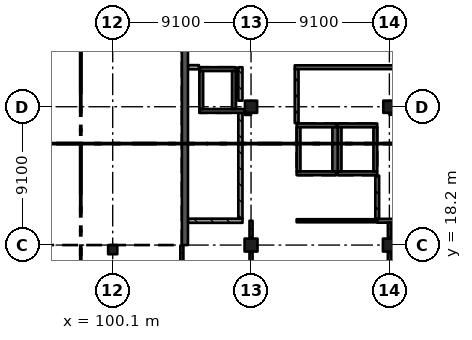
"""IFC4 building model, lengths in metres.
Left out: names, types, materials, properties, quantities, classifications, styles, units other than length and angle.
Written with IfcOpenShell. Run it as: python <this file> out.ifc"""

import sys

from ifc_helpers import new_model, si_unit, direction, frame, frame_2d, origin, origin_2d, place, context, subcontext, project, spatial, rectangle, extrude, element, fill, save


model = new_model("IFC4")
c1 = context("Model", 3, precision=1e-05, world=origin(), true_north=direction((0.0, 1.0)))
c2 = subcontext(c1, "Body", "Model", "MODEL_VIEW")
j1 = project(units=[si_unit("LENGTHUNIT", "METRE"), si_unit("PLANEANGLEUNIT", "RADIAN")], contexts=[c1])
p1 = place(None, origin())
s1 = spatial("IfcSite", under=j1, at=p1, CompositionType="ELEMENT")
p2 = place(p1, origin())
s2 = spatial("IfcBuilding", under=s1, at=p2, CompositionType="ELEMENT")
p3 = place(p2, frame((0.0, 0.0, 6.37)))
s3 = spatial("IfcBuildingStorey", under=s2, at=p3, CompositionType="ELEMENT", Elevation=6.37)
p4 = place(p3, frame((100.1, 17.9, 0.0), z_axis=(0.0, 0.0, 1.0), x_axis=(1.0, 0.0, 0.0)))
e1 = element("IfcColumn", 1, at=p4, inside=s3, PredefinedType="COLUMN", context=c2, shape_type="SweptSolid", body=[
    extrude(rectangle(XDim=0.6, YDim=0.6, at=origin_2d()), origin(), (0.0, 0.0, 1.0), 4.55),
])
p5 = place(p3, frame((109.2, 18.2, 0.0), z_axis=(0.0, 0.0, 1.0), x_axis=(1.0, 0.0, 0.0)))
e2 = element("IfcColumn", 2, at=p5, inside=s3, PredefinedType="COLUMN", context=c2, shape_type="SweptSolid", body=[
    extrude(rectangle(XDim=0.85, YDim=0.85, at=origin_2d()), origin(), (0.0, 0.0, 1.0), 4.55),
])
p6 = place(p3, frame((109.2, 27.3, 0.0), z_axis=(0.0, 0.0, 1.0), x_axis=(1.0, 0.0, 0.0)))
e3 = element("IfcColumn", 3, at=p6, inside=s3, PredefinedType="COLUMN", context=c2, shape_type="SweptSolid", body=[
    extrude(rectangle(XDim=0.8, YDim=0.8, at=origin_2d()), origin(), (0.0, 0.0, 1.0), 4.55),
])
p7 = place(p3, frame((118.3, 18.2, 0.0), z_axis=(0.0, 0.0, 1.0), x_axis=(1.0, 0.0, 0.0)))
e4 = element("IfcColumn", 4, at=p7, inside=s3, PredefinedType="COLUMN", context=c2, shape_type="SweptSolid", body=[
    extrude(rectangle(XDim=0.85, YDim=0.85, at=origin_2d()), origin(), (0.0, 0.0, 1.0), 4.55),
])
p8 = place(p3, frame((118.3, 27.3, 0.0), z_axis=(0.0, 0.0, 1.0), x_axis=(1.0, 0.0, 0.0)))
e5 = element("IfcColumn", 5, at=p8, inside=s3, PredefinedType="COLUMN", context=c2, shape_type="SweptSolid", body=[
    extrude(rectangle(XDim=0.8, YDim=0.8, at=origin_2d()), origin(), (0.0, 0.0, 1.0), 4.55),
])
p9 = place(p3, frame((104.85, 40.95, 0.0), z_axis=(0.0, 0.0, 1.0), x_axis=(0.0, -1.0, 0.0)))
e6 = element("IfcWall", 6, at=p9, inside=s3, PredefinedType="SHEAR", context=c2, shape_type="SweptSolid", body=[
    extrude(rectangle(XDim=22.75, YDim=0.4, at=frame_2d((11.375, 0.0))), origin(), (0.0, 0.0, 1.0), 4.55),
])
p10 = place(p3, frame((117.5, 22.925, 0.0), z_axis=(0.0, 0.0, 1.0), x_axis=(-1.0, 0.0, 0.0)))
e7 = element("IfcWall", 7, at=p10, inside=s3, PredefinedType="SHEAR", context=c2, shape_type="SweptSolid", body=[
    extrude(rectangle(XDim=2.6, YDim=0.25, at=frame_2d((1.3, 0.0))), origin(), (0.0, 0.0, 1.0), 4.55),
])
p11 = place(p10, frame((0.8, 0.0, 0.0)))
e8 = element("IfcOpeningElement", 8, at=p11, cuts=e7, PredefinedType="OPENING", context=c2, shape_type="SweptSolid", body=[
    extrude(rectangle(XDim=1.0, YDim=2.1, at=frame_2d((0.5, 1.05))), frame((0.0, 0.135, 0.0), z_axis=(0.0, -1.0, 0.0), x_axis=(1.0, 0.0, 0.0)), (0.0, 0.0, 1.0), 0.27),
])
p12 = place(p3, frame((117.5, 26.075, 0.0), z_axis=(0.0, 0.0, 1.0), x_axis=(-1.0, 0.0, 0.0)))
e9 = element("IfcWall", 9, at=p12, inside=s3, PredefinedType="SHEAR", context=c2, shape_type="SweptSolid", body=[
    extrude(rectangle(XDim=2.6, YDim=0.25, at=frame_2d((1.3, 0.0))), origin(), (0.0, 0.0, 1.0), 4.55),
])
for number, where, z_axis, x_axis in (
    (10, (115.025, 25.95, 0.0), (0.0, 0.0, 1.0), (0.0, -1.0, 0.0)),
    (11, (117.375, 25.95, 0.0), (0.0, 0.0, 1.0), (0.0, -1.0, 0.0)),
):
    element("IfcWall", number, at=place(p3, frame(where, z_axis=z_axis, x_axis=x_axis)), inside=s3, PredefinedType="SHEAR", context=c2, shape_type="SweptSolid", body=[
        extrude(rectangle(XDim=2.9, YDim=0.25, at=frame_2d((1.45, 0.0))), origin(), (0.0, 0.0, 1.0), 4.55),
    ])
p13 = place(p3, frame((114.8, 22.925, 0.0), z_axis=(0.0, 0.0, 1.0), x_axis=(-1.0, 0.0, 0.0)))
e12 = element("IfcWall", 12, at=p13, inside=s3, PredefinedType="SHEAR", context=c2, shape_type="SweptSolid", body=[
    extrude(rectangle(XDim=2.6, YDim=0.25, at=frame_2d((1.3, 0.0))), origin(), (0.0, 0.0, 1.0), 4.55),
])
p14 = place(p13, frame((0.8, 0.0, 0.0)))
e13 = element("IfcOpeningElement", 13, at=p14, cuts=e12, PredefinedType="OPENING", context=c2, shape_type="SweptSolid", body=[
    extrude(rectangle(XDim=1.0, YDim=2.1, at=frame_2d((0.5, 1.05))), frame((0.0, 0.135, 0.0), z_axis=(0.0, -1.0, 0.0), x_axis=(1.0, 0.0, 0.0)), (0.0, 0.0, 1.0), 0.27),
])
p15 = place(p3, frame((114.8, 26.075, 0.0), z_axis=(0.0, 0.0, 1.0), x_axis=(-1.0, 0.0, 0.0)))
e14 = element("IfcWall", 14, at=p15, inside=s3, PredefinedType="SHEAR", context=c2, shape_type="SweptSolid", body=[
    extrude(rectangle(XDim=2.6, YDim=0.25, at=frame_2d((1.3, 0.0))), origin(), (0.0, 0.0, 1.0), 4.55),
])
p16 = place(p3, frame((112.325, 25.95, 0.0), z_axis=(0.0, 0.0, 1.0), x_axis=(0.0, -1.0, 0.0)))
e15 = element("IfcWall", 15, at=p16, inside=s3, PredefinedType="SHEAR", context=c2, shape_type="SweptSolid", body=[
    extrude(rectangle(XDim=2.9, YDim=0.25, at=frame_2d((1.45, 0.0))), origin(), (0.0, 0.0, 1.0), 4.55),
])
p17 = place(p3, frame((114.725, 25.95, 0.0), z_axis=(0.0, 0.0, 1.0), x_axis=(0.0, -1.0, 0.0)))
e16 = element("IfcWall", 16, at=p17, inside=s3, PredefinedType="SHEAR", context=c2, shape_type="SweptSolid", body=[
    extrude(rectangle(XDim=2.9, YDim=0.35, at=frame_2d((1.45, 0.0))), origin(), (0.0, 0.0, 1.0), 4.55),
])
p18 = place(p3, frame((108.8, 27.025, 0.0), z_axis=(0.0, 0.0, 1.0), x_axis=(-1.0, 0.0, 0.0)))
e17 = element("IfcWall", 17, at=p18, inside=s3, PredefinedType="SHEAR", context=c2, shape_type="SweptSolid", body=[
    extrude(rectangle(XDim=3.0, YDim=0.25, at=frame_2d((1.5, 0.0))), origin(), (0.0, 0.0, 1.0), 4.55),
])
p19 = place(p18, frame((0.75, 0.0, 0.0)))
e18 = element("IfcOpeningElement", 18, at=p19, cuts=e17, PredefinedType="OPENING", context=c2, shape_type="SweptSolid", body=[
    extrude(rectangle(XDim=0.9, YDim=2.1, at=frame_2d((0.45, 1.05))), frame((0.0, 0.135, 0.0), z_axis=(0.0, -1.0, 0.0), x_axis=(1.0, 0.0, 0.0)), (0.0, 0.0, 1.0), 0.27),
])
p20 = place(p3, frame((108.2, 29.775, 0.0), z_axis=(0.0, 0.0, 1.0), x_axis=(-1.0, 0.0, 0.0)))
e19 = element("IfcWall", 19, at=p20, inside=s3, PredefinedType="SHEAR", context=c2, shape_type="SweptSolid", body=[
    extrude(rectangle(XDim=2.4, YDim=0.25, at=frame_2d((1.2, 0.0))), origin(), (0.0, 0.0, 1.0), 4.55),
])
for number, where, z_axis, x_axis in (
    (20, (105.925, 29.65, 0.0), (0.0, 0.0, 1.0), (0.0, -1.0, 0.0)),
    (21, (108.075, 29.65, 0.0), (0.0, 0.0, 1.0), (0.0, -1.0, 0.0)),
):
    element("IfcWall", number, at=place(p3, frame(where, z_axis=z_axis, x_axis=x_axis)), inside=s3, PredefinedType="SHEAR", context=c2, shape_type="SweptSolid", body=[
        extrude(rectangle(XDim=2.5, YDim=0.25, at=frame_2d((1.25, 0.0))), origin(), (0.0, 0.0, 1.0), 4.55),
    ])
p21 = place(p3, frame((104.65, 10.8, 0.0), z_axis=(0.0, 0.0, 1.0), x_axis=(0.0, 1.0, 0.0)))
e22 = element("IfcWall", 22, at=p21, inside=s3, PredefinedType="PARTITIONING", context=c2, shape_type="SweptSolid", body=[
    extrude(rectangle(XDim=7.37, YDim=0.2, at=frame_2d((3.685, 0.0))), origin(), (0.0, 0.0, 1.0), 4.25),
])
p22 = place(p21, frame((0.95, 0.0, 0.0)))
e23 = element("IfcOpeningElement", 23, at=p22, cuts=e22, PredefinedType="OPENING", context=c2, shape_type="SweptSolid", body=[
    extrude(rectangle(XDim=1.8, YDim=2.4, at=frame_2d((0.9, 1.2))), frame((0.0, 0.11, 0.0), z_axis=(0.0, -1.0, 0.0), x_axis=(1.0, 0.0, 0.0)), (0.0, 0.0, 1.0), 0.22),
])
p23 = place(p21, frame((4.65, 0.0, 0.0)))
e24 = element("IfcOpeningElement", 24, at=p23, cuts=e22, PredefinedType="OPENING", context=c2, shape_type="SweptSolid", body=[
    extrude(rectangle(XDim=1.8, YDim=2.4, at=frame_2d((0.9, 1.2))), frame((0.0, 0.11, 0.0), z_axis=(0.0, -1.0, 0.0), x_axis=(1.0, 0.0, 0.0)), (0.0, 0.0, 1.0), 0.22),
])
p24 = place(p3, frame((105.05, 19.8, 0.0), z_axis=(0.0, 0.0, 1.0), x_axis=(1.0, 0.0, 0.0)))
e25 = element("IfcWall", 25, at=p24, inside=s3, PredefinedType="SOLIDWALL", context=c2, shape_type="SweptSolid", body=[
    extrude(rectangle(XDim=3.587, YDim=0.275, at=frame_2d((1.794, 0.0))), origin(), (0.0, 0.0, 1.0), 4.25),
])
p25 = place(p24, frame((1.15, 0.0, 0.0)))
e26 = element("IfcOpeningElement", 26, at=p25, cuts=e25, PredefinedType="OPENING", context=c2, shape_type="SweptSolid", body=[
    extrude(rectangle(XDim=1.2, YDim=2.4, at=frame_2d((0.6, 1.2))), frame((0.0, 0.147, 0.0), z_axis=(0.0, -1.0, 0.0), x_axis=(1.0, 0.0, 0.0)), (0.0, 0.0, 1.0), 0.295),
])
p26 = place(p3, frame((105.05, 29.9, 0.0), z_axis=(0.0, 0.0, 1.0), x_axis=(1.0, 0.0, 0.0)))
e27 = element("IfcWall", 27, at=p26, inside=s3, PredefinedType="SOLIDWALL", context=c2, shape_type="SweptSolid", body=[
    extrude(rectangle(XDim=0.72, YDim=0.275, at=frame_2d((0.36, 0.0))), origin(), (0.0, 0.0, 1.0), 4.25),
])
p27 = place(p3, frame((108.5, 19.938, 0.0), z_axis=(0.0, 0.0, 1.0), x_axis=(0.0, 1.0, 0.0)))
e28 = element("IfcWall", 28, at=p27, inside=s3, PredefinedType="SOLIDWALL", context=c2, shape_type="SweptSolid", body=[
    extrude(rectangle(XDim=6.962, YDim=0.275, at=frame_2d((3.481, 0.0))), origin(), (0.0, 0.0, 1.0), 4.25),
])
p28 = place(p3, frame((108.5, 27.7, 0.0), z_axis=(0.0, 0.0, 1.0), x_axis=(0.0, 1.0, 0.0)))
e29 = element("IfcWall", 29, at=p28, inside=s3, PredefinedType="SOLIDWALL", context=c2, shape_type="SweptSolid", body=[
    extrude(rectangle(XDim=2.2, YDim=0.275, at=frame_2d((1.1, 0.0))), origin(), (0.0, 0.0, 1.0), 4.25),
])
p29 = place(p3, frame((108.8, 26.9, 0.0), z_axis=(0.0, 0.0, 1.0), x_axis=(1.0, 0.0, 0.0)))
e30 = element("IfcWall", 30, at=p29, inside=s3, PredefinedType="SOLIDWALL", context=c2, shape_type="SweptSolid", body=[
    extrude(rectangle(XDim=0.4, YDim=0.275, at=frame_2d((0.2, 0.0))), origin(), (0.0, 0.0, 1.0), 4.25),
])
p30 = place(p3, frame((109.2, 10.9, 0.0), z_axis=(0.0, 0.0, 1.0), x_axis=(0.0, 1.0, 0.0)))
e31 = element("IfcWall", 31, at=p30, inside=s3, PredefinedType="PARTITIONING", context=c2, shape_type="SweptSolid", body=[
    extrude(rectangle(XDim=6.875, YDim=0.2, at=frame_2d((3.438, 0.0))), origin(), (0.0, 0.0, 1.0), 3.55),
])
p31 = place(p30, frame((0.85, 0.0, 0.0)))
e32 = element("IfcOpeningElement", 32, at=p31, cuts=e31, PredefinedType="OPENING", context=c2, shape_type="SweptSolid", body=[
    extrude(rectangle(XDim=1.8, YDim=2.4, at=frame_2d((0.9, 1.2))), frame((0.0, 0.11, 0.0), z_axis=(0.0, -1.0, 0.0), x_axis=(1.0, 0.0, 0.0)), (0.0, 0.0, 1.0), 0.22),
])
p32 = place(p30, frame((4.25, 0.0, 0.0)))
e33 = element("IfcOpeningElement", 33, at=p32, cuts=e31, PredefinedType="OPENING", context=c2, shape_type="SweptSolid", body=[
    extrude(rectangle(XDim=1.8, YDim=2.4, at=frame_2d((0.9, 1.2))), frame((0.0, 0.11, 0.0), z_axis=(0.0, -1.0, 0.0), x_axis=(1.0, 0.0, 0.0)), (0.0, 0.0, 1.0), 0.22),
])
p33 = place(p3, frame((109.2, 18.625, 0.0), z_axis=(0.0, 0.0, 1.0), x_axis=(0.0, 1.0, 0.0)))
e34 = element("IfcWall", 34, at=p33, inside=s3, PredefinedType="PARTITIONING", context=c2, shape_type="SweptSolid", body=[
    extrude(rectangle(XDim=1.175, YDim=0.2, at=frame_2d((0.587, 0.0))), origin(), (0.0, 0.0, 1.0), 3.55),
])
p34 = place(p3, frame((112.075, 29.9, 0.0), z_axis=(0.0, 0.0, 1.0), x_axis=(1.0, 0.0, 0.0)))
e35 = element("IfcWall", 35, at=p34, inside=s3, PredefinedType="SOLIDWALL", context=c2, shape_type="SweptSolid", body=[
    extrude(rectangle(XDim=6.795, YDim=0.25, at=frame_2d((3.397, 0.0))), origin(), (0.0, 0.0, 1.0), 4.25),
])
p35 = place(p3, frame((112.2, 19.8, 0.0), z_axis=(0.0, 0.0, 1.0), x_axis=(1.0, 0.0, 0.0)))
e36 = element("IfcWall", 36, at=p35, inside=s3, PredefinedType="PARTITIONING", context=c2, shape_type="SweptSolid", body=[
    extrude(rectangle(XDim=5.3, YDim=0.2, at=frame_2d((2.65, 0.0))), origin(), (0.0, 0.0, 1.0), 4.25),
])
p36 = place(p35, frame((1.75, 0.0, 0.0)))
e37 = element("IfcOpeningElement", 37, at=p36, cuts=e36, PredefinedType="OPENING", context=c2, shape_type="SweptSolid", body=[
    extrude(rectangle(XDim=1.8, YDim=2.4, at=frame_2d((0.9, 1.2))), frame((0.0, 0.11, 0.0), z_axis=(0.0, -1.0, 0.0), x_axis=(1.0, 0.0, 0.0)), (0.0, 0.0, 1.0), 0.22),
])
p37 = place(p3, frame((112.2, 26.23, 0.0), z_axis=(0.0, 0.0, 1.0), x_axis=(0.0, 1.0, 0.0)))
e38 = element("IfcWall", 38, at=p37, inside=s3, PredefinedType="SOLIDWALL", context=c2, shape_type="SweptSolid", body=[
    extrude(rectangle(XDim=3.545, YDim=0.25, at=frame_2d((1.772, 0.0))), origin(), (0.0, 0.0, 1.0), 4.25),
])
p38 = place(p3, frame((117.5, 19.8, 0.0), z_axis=(0.0, 0.0, 1.0), x_axis=(1.0, 0.0, 0.0)))
e39 = element("IfcWall", 39, at=p38, inside=s3, PredefinedType="SOLIDWALL", context=c2, shape_type="SweptSolid", body=[
    extrude(rectangle(XDim=3.8, YDim=0.25, at=frame_2d((1.9, 0.0))), origin(), (0.0, 0.0, 1.0), 4.25),
])
p39 = place(p38, frame((1.85, 0.0, 0.0)))
e40 = element("IfcOpeningElement", 40, at=p39, cuts=e39, PredefinedType="OPENING", context=c2, shape_type="SweptSolid", body=[
    extrude(rectangle(XDim=1.0, YDim=2.1, at=frame_2d((0.5, 1.05))), frame((0.0, 0.135, 0.0), z_axis=(0.0, -1.0, 0.0), x_axis=(1.0, 0.0, 0.0)), (0.0, 0.0, 1.0), 0.27),
])
p40 = place(p3, frame((117.5, 19.925, 0.0), z_axis=(0.0, 0.0, 1.0), x_axis=(0.0, 1.0, 0.0)))
e41 = element("IfcWall", 41, at=p40, inside=s3, PredefinedType="SOLIDWALL", context=c2, shape_type="SweptSolid", body=[
    extrude(rectangle(XDim=2.845, YDim=0.25, at=frame_2d((1.422, 0.0))), origin(), (0.0, 0.0, 1.0), 4.25),
])
p41 = place(p3, frame((118.3, 10.925, 0.0), z_axis=(0.0, 0.0, 1.0), x_axis=(0.0, 1.0, 0.0)))
e42 = element("IfcWall", 42, at=p41, inside=s3, PredefinedType="PARTITIONING", context=c2, shape_type="SweptSolid", body=[
    extrude(rectangle(XDim=6.85, YDim=0.2, at=frame_2d((3.425, 0.0))), origin(), (0.0, 0.0, 1.0), 3.55),
])
p42 = place(p41, frame((0.85, 0.0, 0.0)))
e43 = element("IfcOpeningElement", 43, at=p42, cuts=e42, PredefinedType="OPENING", context=c2, shape_type="SweptSolid", body=[
    extrude(rectangle(XDim=1.8, YDim=2.4, at=frame_2d((0.9, 1.2))), frame((0.0, 0.11, 0.0), z_axis=(0.0, -1.0, 0.0), x_axis=(1.0, 0.0, 0.0)), (0.0, 0.0, 1.0), 0.22),
])
p43 = place(p41, frame((4.25, 0.0, 0.0)))
e44 = element("IfcOpeningElement", 44, at=p43, cuts=e42, PredefinedType="OPENING", context=c2, shape_type="SweptSolid", body=[
    extrude(rectangle(XDim=1.8, YDim=2.4, at=frame_2d((0.9, 1.2))), frame((0.0, 0.11, 0.0), z_axis=(0.0, -1.0, 0.0), x_axis=(1.0, 0.0, 0.0)), (0.0, 0.0, 1.0), 0.22),
])
p44 = place(p3, frame((118.3, 18.625, 0.0), z_axis=(0.0, 0.0, 1.0), x_axis=(0.0, 1.0, 0.0)))
e45 = element("IfcWall", 45, at=p44, inside=s3, PredefinedType="PARTITIONING", context=c2, shape_type="SweptSolid", body=[
    extrude(rectangle(XDim=1.05, YDim=0.2, at=frame_2d((0.525, 0.0))), origin(), (0.0, 0.0, 1.0), 3.55),
])
p45 = place(p3, frame((118.3, 26.9, 0.0), z_axis=(0.0, 0.0, 1.0), x_axis=(1.0, 0.0, 0.0)))
e46 = element("IfcWall", 46, at=p45, inside=s3, PredefinedType="SOLIDWALL", context=c2, shape_type="SweptSolid", body=[
    extrude(rectangle(XDim=0.4, YDim=0.25, at=frame_2d((0.2, 0.0))), origin(), (0.0, 0.0, 1.0), 4.25),
])
p46 = place(p25, origin())
e47 = element("IfcDoor", 47, at=p46, inside=s3, OperationType="SINGLE_SWING_RIGHT", PredefinedType="DOOR", context=c2, shape_type="SweptSolid", body=[
    extrude(rectangle(XDim=1.2, YDim=2.4, at=frame_2d((0.6, 1.2))), frame((0.0, 0.025, 0.0), z_axis=(0.0, -1.0, 0.0), x_axis=(1.0, 0.0, 0.0)), (0.0, 0.0, 1.0), 0.05),
])
fill(e26, e47)
p47 = place(p36, origin())
e48 = element("IfcDoor", 48, at=p47, inside=s3, OperationType="DOUBLE_DOOR_SINGLE_SWING", PredefinedType="DOOR", context=c2, shape_type="SweptSolid", body=[
    extrude(rectangle(XDim=1.8, YDim=2.4, at=frame_2d((0.9, 1.2))), frame((0.0, 0.025, 0.0), z_axis=(0.0, -1.0, 0.0), x_axis=(1.0, 0.0, 0.0)), (0.0, 0.0, 1.0), 0.05),
])
fill(e37, e48)
p48 = place(p23, origin())
e49 = element("IfcDoor", 49, at=p48, inside=s3, OperationType="DOUBLE_DOOR_SINGLE_SWING", PredefinedType="DOOR", context=c2, shape_type="SweptSolid", body=[
    extrude(rectangle(XDim=1.8, YDim=2.4, at=frame_2d((0.9, 1.2))), frame((0.0, 0.025, 0.0), z_axis=(0.0, -1.0, 0.0), x_axis=(1.0, 0.0, 0.0)), (0.0, 0.0, 1.0), 0.05),
])
fill(e24, e49)
p49 = place(p19, origin())
e50 = element("IfcDoor", 50, at=p49, inside=s3, OperationType="SINGLE_SWING_LEFT", PredefinedType="DOOR", context=c2, shape_type="SweptSolid", body=[
    extrude(rectangle(XDim=0.9, YDim=2.1, at=frame_2d((0.45, 1.05))), frame((0.0, 0.025, 0.0), z_axis=(0.0, -1.0, 0.0), x_axis=(1.0, 0.0, 0.0)), (0.0, 0.0, 1.0), 0.05),
])
fill(e18, e50)
p50 = place(p11, origin())
e51 = element("IfcDoor", 51, at=p50, inside=s3, OperationType="DOUBLE_DOOR_SLIDING", PredefinedType="DOOR", context=c2, shape_type="SweptSolid", body=[
    extrude(rectangle(XDim=1.0, YDim=2.1, at=frame_2d((0.5, 1.05))), frame((0.0, 0.025, 0.0), z_axis=(0.0, -1.0, 0.0), x_axis=(1.0, 0.0, 0.0)), (0.0, 0.0, 1.0), 0.05),
])
fill(e8, e51)
p51 = place(p14, origin())
e52 = element("IfcDoor", 52, at=p51, inside=s3, OperationType="DOUBLE_DOOR_SLIDING", PredefinedType="DOOR", context=c2, shape_type="SweptSolid", body=[
    extrude(rectangle(XDim=1.0, YDim=2.1, at=frame_2d((0.5, 1.05))), frame((0.0, 0.025, 0.0), z_axis=(0.0, -1.0, 0.0), x_axis=(1.0, 0.0, 0.0)), (0.0, 0.0, 1.0), 0.05),
])
fill(e13, e52)
save(model, sys.argv[1])
